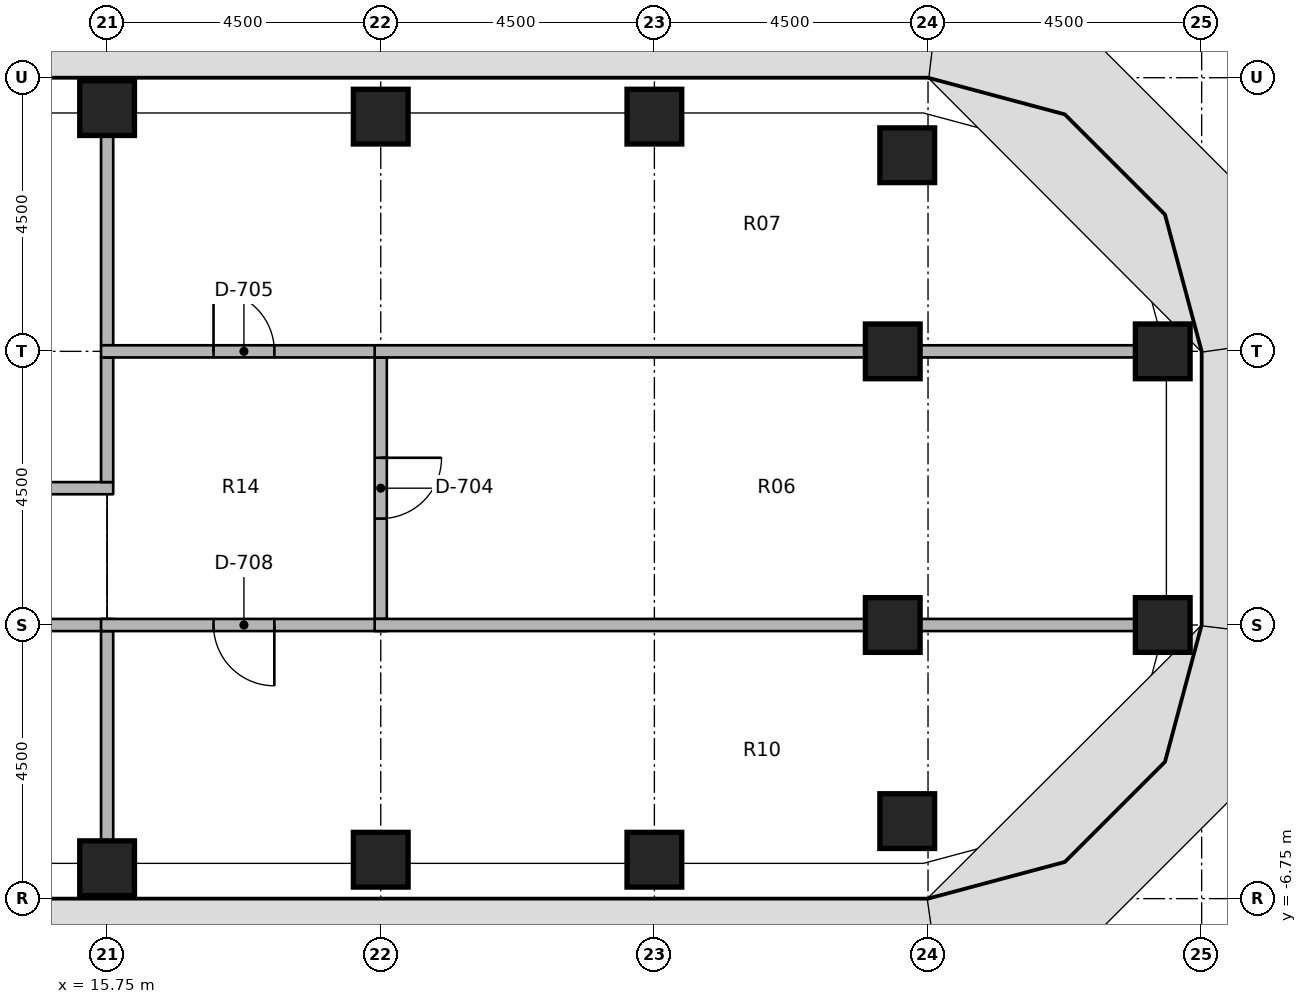
"""IFC4 building model, lengths in metres.
Left out: names, types, materials, properties, quantities, classifications, styles, units other than length and angle.
Written with IfcOpenShell. Run it as: python <this file> out.ifc"""

import sys

from ifc_helpers import new_model, si_unit, direction, frame, frame_2d, origin, origin_2d, place, context, subcontext, project, spatial, rectangle, extrude, element, fill, save


model = new_model("IFC4")
c1 = context("Model", 3, precision=1e-05, world=origin(), true_north=direction((0.0, 1.0)))
c2 = subcontext(c1, "Body", "Model", "MODEL_VIEW")
j1 = project(units=[si_unit("LENGTHUNIT", "METRE"), si_unit("PLANEANGLEUNIT", "RADIAN")], contexts=[c1])
p1 = place(None, origin())
s1 = spatial("IfcSite", under=j1, at=p1, CompositionType="ELEMENT")
p2 = place(p1, origin())
s2 = spatial("IfcBuilding", under=s1, at=p2, CompositionType="ELEMENT")
p3 = place(p2, frame((0.0, 0.0, 94.2)))
s3 = spatial("IfcBuildingStorey", under=s2, at=p3, CompositionType="ELEMENT", Elevation=94.2)
for number, where, z_axis, x_axis in (
    (1, (15.75, -6.25, 0.0), (0.0, 0.0, 1.0), (1.0, 0.0, 0.0)),
    (2, (15.75, 6.25, 0.0), (0.0, 0.0, 1.0), (1.0, 0.0, 0.0)),
    (3, (20.25, -6.11, 0.0), (0.0, 0.0, 1.0), (1.0, 0.0, 0.0)),
    (4, (20.25, 6.11, 0.0), (0.0, 0.0, 1.0), (1.0, 0.0, 0.0)),
    (5, (24.75, -6.11, 0.0), (0.0, 0.0, 1.0), (1.0, 0.0, 0.0)),
    (6, (24.75, 6.11, 0.0), (0.0, 0.0, 1.0), (1.0, 0.0, 0.0)),
    (7, (28.908, -5.475, 0.0), (0.0, 0.0, 1.0), (1.0, 0.0, 0.0)),
    (8, (28.67, -2.25, 0.0), (0.0, 0.0, 1.0), (1.0, 0.0, 0.0)),
    (9, (28.67, 2.25, 0.0), (0.0, 0.0, 1.0), (1.0, 0.0, 0.0)),
    (10, (28.908, 5.475, 0.0), (0.0, 0.0, 1.0), (1.0, 0.0, 0.0)),
    (11, (33.11, -2.25, 0.0), (0.0, 0.0, 1.0), (1.0, 0.0, 0.0)),
    (12, (33.11, 2.25, 0.0), (0.0, 0.0, 1.0), (1.0, 0.0, 0.0)),
):
    element("IfcColumn", number, at=place(p3, frame(where, z_axis=z_axis, x_axis=x_axis)), inside=s3, PredefinedType="COLUMN", context=c2, shape_type="SweptSolid", body=[
        extrude(rectangle(XDim=0.9, YDim=0.9, at=origin_2d()), origin(), (0.0, 0.0, 1.0), 3.65),
    ])
p4 = place(p3, frame((11.15, 0.0, 0.0), z_axis=(0.0, 0.0, 1.0), x_axis=(1.0, 0.0, 0.0)))
e13 = element("IfcWall", 13, at=p4, inside=s3, PredefinedType="PARTITIONING", context=c2, shape_type="SweptSolid", body=[
    extrude(rectangle(XDim=4.7, YDim=0.2, at=frame_2d((2.35, 0.0))), origin(), (0.0, 0.0, 1.0), 2.738),
])
p5 = place(p4, frame((1.85, 0.0, 0.0)))
e14 = element("IfcOpeningElement", 14, at=p5, cuts=e13, PredefinedType="OPENING", context=c2, shape_type="SweptSolid", body=[
    extrude(rectangle(XDim=1.0, YDim=2.1, at=frame_2d((0.5, 1.05))), frame((0.0, 0.11, 0.0), z_axis=(0.0, -1.0, 0.0), x_axis=(1.0, 0.0, 0.0)), (0.0, 0.0, 1.0), 0.22),
])
p6 = place(p3, frame((15.85, -2.25, 0.0), z_axis=(0.0, 0.0, 1.0), x_axis=(-1.0, 0.0, 0.0)))
e15 = element("IfcWall", 15, at=p6, inside=s3, PredefinedType="PARTITIONING", context=c2, shape_type="SweptSolid", body=[
    extrude(rectangle(XDim=4.7, YDim=0.2, at=frame_2d((2.35, 0.0))), origin(), (0.0, 0.0, 1.0), 2.738),
])
p7 = place(p6, frame((1.85, 0.0, 0.0)))
e16 = element("IfcOpeningElement", 16, at=p7, cuts=e15, PredefinedType="OPENING", context=c2, shape_type="SweptSolid", body=[
    extrude(rectangle(XDim=1.0, YDim=2.1, at=frame_2d((0.5, 1.05))), frame((0.0, 0.11, 0.0), z_axis=(0.0, -1.0, 0.0), x_axis=(1.0, 0.0, 0.0)), (0.0, 0.0, 1.0), 0.22),
])
p8 = place(p3, frame((15.75, 0.1, 0.0), z_axis=(0.0, 0.0, 1.0), x_axis=(0.0, 1.0, 0.0)))
e17 = element("IfcWall", 17, at=p8, inside=s3, PredefinedType="PARTITIONING", context=c2, shape_type="SweptSolid", body=[
    extrude(rectangle(XDim=2.05, YDim=0.2, at=frame_2d((1.025, 0.0))), origin(), (0.0, 0.0, 1.0), 2.738),
])
for number, where, z_axis, x_axis in (
    (18, (15.75, 2.35, 0.0), (0.0, 0.0, 1.0), (0.0, 1.0, 0.0)),
    (19, (15.75, -5.8, 0.0), (0.0, 0.0, 1.0), (0.0, 1.0, 0.0)),
):
    element("IfcWall", number, at=place(p3, frame(where, z_axis=z_axis, x_axis=x_axis)), inside=s3, PredefinedType="PARTITIONING", context=c2, shape_type="SweptSolid", body=[
        extrude(rectangle(XDim=3.45, YDim=0.2, at=frame_2d((1.725, 0.0))), origin(), (0.0, 0.0, 1.0), 2.738),
    ])
p9 = place(p3, frame((15.65, 2.25, 0.0), z_axis=(0.0, 0.0, 1.0), x_axis=(1.0, 0.0, 0.0)))
e20 = element("IfcWall", 20, at=p9, inside=s3, PredefinedType="PARTITIONING", context=c2, shape_type="SweptSolid", body=[
    extrude(rectangle(XDim=4.7, YDim=0.2, at=frame_2d((2.35, 0.0))), origin(), (0.0, 0.0, 1.0), 2.738),
])
p10 = place(p9, frame((1.85, 0.0, 0.0)))
e21 = element("IfcOpeningElement", 21, at=p10, cuts=e20, PredefinedType="OPENING", context=c2, shape_type="SweptSolid", body=[
    extrude(rectangle(XDim=1.0, YDim=2.1, at=frame_2d((0.5, 1.05))), frame((0.0, 0.11, 0.0), z_axis=(0.0, -1.0, 0.0), x_axis=(1.0, 0.0, 0.0)), (0.0, 0.0, 1.0), 0.22),
])
p11 = place(p3, frame((20.35, -2.25, 0.0), z_axis=(0.0, 0.0, 1.0), x_axis=(-1.0, 0.0, 0.0)))
e22 = element("IfcWall", 22, at=p11, inside=s3, PredefinedType="PARTITIONING", context=c2, shape_type="SweptSolid", body=[
    extrude(rectangle(XDim=4.7, YDim=0.2, at=frame_2d((2.35, 0.0))), origin(), (0.0, 0.0, 1.0), 2.738),
])
p12 = place(p11, frame((1.85, 0.0, 0.0)))
e23 = element("IfcOpeningElement", 23, at=p12, cuts=e22, PredefinedType="OPENING", context=c2, shape_type="SweptSolid", body=[
    extrude(rectangle(XDim=1.0, YDim=2.1, at=frame_2d((0.5, 1.05))), frame((0.0, 0.11, 0.0), z_axis=(0.0, -1.0, 0.0), x_axis=(1.0, 0.0, 0.0)), (0.0, 0.0, 1.0), 0.22),
])
p13 = place(p3, frame((20.25, 2.15, 0.0), z_axis=(0.0, 0.0, 1.0), x_axis=(0.0, -1.0, 0.0)))
e24 = element("IfcWall", 24, at=p13, inside=s3, PredefinedType="PARTITIONING", context=c2, shape_type="SweptSolid", body=[
    extrude(rectangle(XDim=4.3, YDim=0.2, at=frame_2d((2.15, 0.0))), origin(), (0.0, 0.0, 1.0), 2.738),
])
p14 = place(p13, frame((1.65, 0.0, 0.0)))
e25 = element("IfcOpeningElement", 25, at=p14, cuts=e24, PredefinedType="OPENING", context=c2, shape_type="SweptSolid", body=[
    extrude(rectangle(XDim=1.0, YDim=2.1, at=frame_2d((0.5, 1.05))), frame((0.0, 0.11, 0.0), z_axis=(0.0, -1.0, 0.0), x_axis=(1.0, 0.0, 0.0)), (0.0, 0.0, 1.0), 0.22),
])
p15 = place(p3, frame((20.15, 2.25, 0.0), z_axis=(0.0, 0.0, 1.0), x_axis=(1.0, 0.0, 0.0)))
e26 = element("IfcWall", 26, at=p15, inside=s3, PredefinedType="PARTITIONING", context=c2, shape_type="SweptSolid", body=[
    extrude(rectangle(XDim=8.07, YDim=0.2, at=frame_2d((4.035, 0.0))), origin(), (0.0, 0.0, 1.0), 2.738),
])
p16 = place(p3, frame((29.12, 2.25, 0.0), z_axis=(0.0, 0.0, 1.0), x_axis=(1.0, 0.0, 0.0)))
e27 = element("IfcWall", 27, at=p16, inside=s3, PredefinedType="PARTITIONING", context=c2, shape_type="SweptSolid", body=[
    extrude(rectangle(XDim=3.54, YDim=0.2, at=frame_2d((1.77, 0.0))), origin(), (0.0, 0.0, 1.0), 2.738),
])
p17 = place(p3, frame((20.15, -2.25, 0.0), z_axis=(0.0, 0.0, 1.0), x_axis=(1.0, 0.0, 0.0)))
e28 = element("IfcWall", 28, at=p17, inside=s3, PredefinedType="PARTITIONING", context=c2, shape_type="SweptSolid", body=[
    extrude(rectangle(XDim=8.07, YDim=0.2, at=frame_2d((4.035, 0.0))), origin(), (0.0, 0.0, 1.0), 2.738),
])
p18 = place(p3, frame((29.12, -2.25, 0.0), z_axis=(0.0, 0.0, 1.0), x_axis=(1.0, 0.0, 0.0)))
e29 = element("IfcWall", 29, at=p18, inside=s3, PredefinedType="PARTITIONING", context=c2, shape_type="SweptSolid", body=[
    extrude(rectangle(XDim=3.54, YDim=0.2, at=frame_2d((1.77, 0.0))), origin(), (0.0, 0.0, 1.0), 2.738),
])
p19 = place(p14, origin())
e30 = element("IfcDoor", 30, at=p19, inside=s3, OperationType="SINGLE_SWING_RIGHT", PredefinedType="DOOR", context=c2, shape_type="SweptSolid", body=[
    extrude(rectangle(XDim=1.0, YDim=2.1, at=frame_2d((0.5, 1.05))), frame((0.0, 0.025, 0.0), z_axis=(0.0, -1.0, 0.0), x_axis=(1.0, 0.0, 0.0)), (0.0, 0.0, 1.0), 0.05),
])
fill(e25, e30)
p20 = place(p10, origin())
e31 = element("IfcDoor", 31, at=p20, inside=s3, OperationType="SINGLE_SWING_LEFT", PredefinedType="DOOR", context=c2, shape_type="SweptSolid", body=[
    extrude(rectangle(XDim=1.0, YDim=2.1, at=frame_2d((0.5, 1.05))), frame((0.0, 0.025, 0.0), z_axis=(0.0, -1.0, 0.0), x_axis=(1.0, 0.0, 0.0)), (0.0, 0.0, 1.0), 0.05),
])
fill(e21, e31)
p21 = place(p12, origin())
e32 = element("IfcDoor", 32, at=p21, inside=s3, OperationType="SINGLE_SWING_RIGHT", PredefinedType="DOOR", context=c2, shape_type="SweptSolid", body=[
    extrude(rectangle(XDim=1.0, YDim=2.1, at=frame_2d((0.5, 1.05))), frame((0.0, 0.025, 0.0), z_axis=(0.0, -1.0, 0.0), x_axis=(1.0, 0.0, 0.0)), (0.0, 0.0, 1.0), 0.05),
])
fill(e23, e32)
save(model, sys.argv[1])
